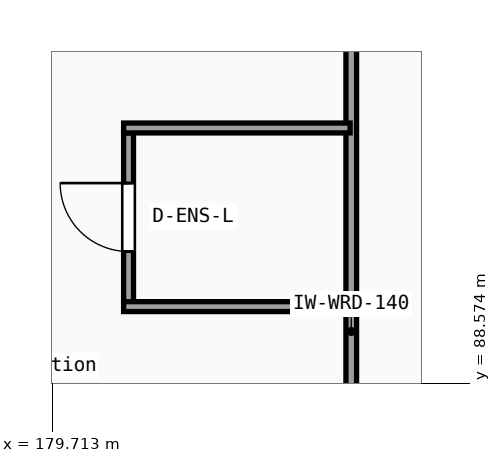
"""IFC4 building model, lengths in metres.
Left out: names, types, materials, properties, quantities, classifications, styles, units other than length and angle.
Written with IfcOpenShell. Run it as: python <this file> out.ifc"""

import sys

from ifc_helpers import new_model, si_unit, direction, frame, frame_2d, origin, place, context, subcontext, project, spatial, rectangle, extrude, element, fill, save


model = new_model("IFC4")
c1 = context("Model", 3, precision=1e-05, world=origin(), true_north=direction((0.0, 1.0)))
c2 = subcontext(c1, "Body", "Model", "MODEL_VIEW")
j1 = project(units=[si_unit("LENGTHUNIT", "METRE"), si_unit("PLANEANGLEUNIT", "RADIAN")], contexts=[c1])
p1 = place(None, origin())
s1 = spatial("IfcSite", under=j1, at=p1, CompositionType="ELEMENT")
p2 = place(p1, origin())
s2 = spatial("IfcBuilding", under=s1, at=p2, CompositionType="ELEMENT")
p3 = place(p2, frame((0.0, 0.0, 31.05)))
s3 = spatial("IfcBuildingStorey", under=s2, at=p3, CompositionType="ELEMENT", Elevation=31.05)
p4 = place(p3, frame((183.647, 82.49, 0.0), z_axis=(0.0, 0.0, 1.0), x_axis=(0.0, 1.0, 0.0)))
e1 = element("IfcWall", 1, at=p4, inside=s3, PredefinedType="PARTITIONING", context=c2, shape_type="SweptSolid", body=[
    extrude(rectangle(XDim=12.025, YDim=0.14, at=frame_2d((6.012, 0.0))), origin(), (0.0, 0.0, 1.0), 3.34),
])
p5 = place(p3, frame((180.717, 89.65, 0.0), z_axis=(0.0, 0.0, 1.0), x_axis=(0.0, 1.0, 0.0)))
e2 = element("IfcWall", 2, at=p5, inside=s3, PredefinedType="PARTITIONING", context=c2, shape_type="SweptSolid", body=[
    extrude(rectangle(XDim=2.22, YDim=0.13, at=frame_2d((1.11, 0.0))), origin(), (0.0, 0.0, 1.0), 3.77),
])
p6 = place(p5, frame((0.66, 0.0, 0.0)))
e3 = element("IfcOpeningElement", 3, at=p6, cuts=e2, PredefinedType="OPENING", context=c2, shape_type="SweptSolid", body=[
    extrude(rectangle(XDim=0.9, YDim=2.1, at=frame_2d((0.45, 1.05))), frame((0.0, 0.075, 0.0), z_axis=(0.0, -1.0, 0.0), x_axis=(1.0, 0.0, 0.0)), (0.0, 0.0, 1.0), 0.15),
])
for number, where, z_axis, x_axis in (
    (4, (180.652, 89.585, 0.0), (0.0, 0.0, 1.0), (1.0, 0.0, 0.0)),
    (5, (180.652, 91.935, 0.0), (0.0, 0.0, 1.0), (1.0, 0.0, 0.0)),
):
    element("IfcWall", number, at=place(p3, frame(where, z_axis=z_axis, x_axis=x_axis)), inside=s3, PredefinedType="PARTITIONING", context=c2, shape_type="SweptSolid", body=[
        extrude(rectangle(XDim=2.98, YDim=0.13, at=frame_2d((1.49, 0.0))), origin(), (0.0, 0.0, 1.0), 3.77),
    ])
p7 = place(p6, origin())
e6 = element("IfcDoor", 6, at=p7, inside=s3, OperationType="SINGLE_SWING_RIGHT", PredefinedType="DOOR", context=c2, shape_type="SweptSolid", body=[
    extrude(rectangle(XDim=0.9, YDim=2.1, at=frame_2d((0.45, 1.05))), frame((0.0, 0.025, 0.0), z_axis=(0.0, -1.0, 0.0), x_axis=(1.0, 0.0, 0.0)), (0.0, 0.0, 1.0), 0.05),
])
fill(e3, e6)
save(model, sys.argv[1])
